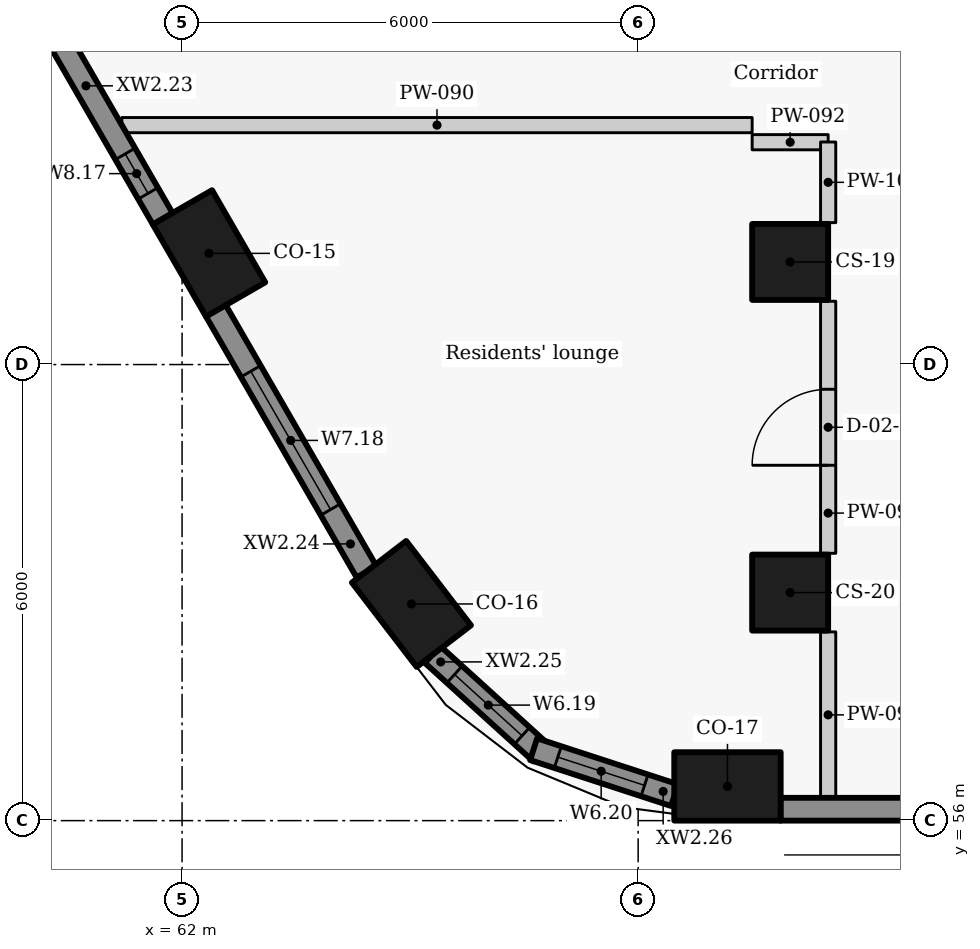
"""IFC4 building model, lengths in metres.
Left out: names, types, materials, properties, quantities, classifications, styles, units other than length and angle.
Written with IfcOpenShell. Run it as: python <this file> out.ifc"""

import sys

from ifc_helpers import new_model, si_unit, direction, frame, frame_2d, origin, origin_2d, place, context, subcontext, project, spatial, rectangle, extrude, element, fill, save


model = new_model("IFC4")
c1 = context("Model", 3, precision=1e-05, world=origin(), true_north=direction((0.0, 1.0)))
c2 = subcontext(c1, "Body", "Model", "MODEL_VIEW")
j1 = project(units=[si_unit("LENGTHUNIT", "METRE"), si_unit("PLANEANGLEUNIT", "RADIAN")], contexts=[c1])
p1 = place(None, origin())
s1 = spatial("IfcSite", under=j1, at=p1, CompositionType="ELEMENT")
p2 = place(p1, origin())
s2 = spatial("IfcBuilding", under=s1, at=p2, CompositionType="ELEMENT")
p3 = place(p2, frame((0.0, 0.0, 117.3)))
s3 = spatial("IfcBuildingStorey", under=s2, at=p3, CompositionType="ELEMENT", Elevation=117.3)
for number, where, z_axis, x_axis in (
    (1, (62.354, 63.463, 0.0), (0.0, 0.0, 1.0), (0.5, -0.866, 0.0)),
    (2, (65.018, 58.851, 0.0), (0.0, 0.0, 1.0), (0.609, -0.793, 0.0)),
    (3, (69.175, 56.45, 0.0), (0.0, 0.0, 1.0), (1.0, 0.0, 0.0)),
):
    element("IfcColumn", number, at=place(p3, frame(where, z_axis=z_axis, x_axis=x_axis)), inside=s3, PredefinedType="COLUMN", context=c2, shape_type="SweptSolid", body=[
        extrude(rectangle(XDim=1.4, YDim=0.9, at=origin_2d()), origin(), (0.0, 0.0, 1.0), 3.3),
    ])
for number, where, z_axis, x_axis in (
    (4, (70.0, 63.35, 0.0), (0.0, 0.0, 1.0), (0.0, -1.0, 0.0)),
    (5, (70.0, 59.0, 0.0), (0.0, 0.0, 1.0), (0.0, -1.0, 0.0)),
):
    element("IfcColumn", number, at=place(p3, frame(where, z_axis=z_axis, x_axis=x_axis)), inside=s3, PredefinedType="COLUMN", context=c2, shape_type="SweptSolid", body=[
        extrude(rectangle(XDim=1.0, YDim=1.0, at=origin_2d()), origin(), (0.0, 0.0, 1.0), 3.3),
    ])
p4 = place(p3, frame((59.78, 67.323, 0.0), z_axis=(0.0, 0.0, 1.0), x_axis=(0.499957037901, -0.866050206543, 0.0)))
e6 = element("IfcWall", 6, at=p4, inside=s3, PredefinedType="SOLIDWALL", context=c2, shape_type="SweptSolid", body=[
    extrude(rectangle(XDim=3.934, YDim=0.3, at=frame_2d((1.967, 0.0))), origin(), (0.0, 0.0, 1.0), 2.05),
])
p5 = place(p4, frame((0.278, 0.0, 0.9)))
e7 = element("IfcOpeningElement", 7, at=p5, cuts=e6, PredefinedType="OPENING", context=c2, shape_type="SweptSolid", body=[
    extrude(rectangle(XDim=0.6, YDim=1.1, at=frame_2d((0.3, 0.55))), frame((0.0, 0.16, 0.0), z_axis=(0.0, -1.0, 0.0), x_axis=(1.0, 0.0, 0.0)), (0.0, 0.0, 1.0), 0.32),
])
p6 = place(p4, frame((2.945, 0.0, 0.9)))
e8 = element("IfcOpeningElement", 8, at=p6, cuts=e6, PredefinedType="OPENING", context=c2, shape_type="SweptSolid", body=[
    extrude(rectangle(XDim=0.6, YDim=1.1, at=frame_2d((0.3, 0.55))), frame((0.0, 0.16, 0.0), z_axis=(0.0, -1.0, 0.0), x_axis=(1.0, 0.0, 0.0)), (0.0, 0.0, 1.0), 0.32),
])
p7 = place(p3, frame((62.443, 62.71, 0.0), z_axis=(0.0, 0.0, 1.0), x_axis=(0.500043828347, -0.866000097998, 0.0)))
e9 = element("IfcWall", 9, at=p7, inside=s3, PredefinedType="SOLIDWALL", context=c2, shape_type="SweptSolid", body=[
    extrude(rectangle(XDim=3.968, YDim=0.3, at=frame_2d((1.984, 0.0))), origin(), (0.0, 0.0, 1.0), 2.05),
])
p8 = place(p7, frame((0.922, 0.0, 0.9)))
e10 = element("IfcOpeningElement", 10, at=p8, cuts=e9, PredefinedType="OPENING", context=c2, shape_type="SweptSolid", body=[
    extrude(rectangle(XDim=2.1, YDim=1.1, at=frame_2d((1.05, 0.55))), frame((0.0, 0.16, 0.0), z_axis=(0.0, -1.0, 0.0), x_axis=(1.0, 0.0, 0.0)), (0.0, 0.0, 1.0), 0.32),
])
p9 = place(p3, frame((65.295, 58.186, 0.0), z_axis=(0.0, 0.0, 1.0), x_axis=(0.740421367382, -0.672142989791, 0.0)))
e11 = element("IfcWall", 11, at=p9, inside=s3, PredefinedType="SOLIDWALL", context=c2, shape_type="SweptSolid", body=[
    extrude(rectangle(XDim=1.927, YDim=0.3, at=frame_2d((0.964, 0.0))), origin(), (0.0, 0.0, 1.0), 2.05),
])
p10 = place(p9, frame((0.391, 0.0, 0.9)))
e12 = element("IfcOpeningElement", 12, at=p10, cuts=e11, PredefinedType="OPENING", context=c2, shape_type="SweptSolid", body=[
    extrude(rectangle(XDim=1.2, YDim=1.1, at=frame_2d((0.6, 0.55))), frame((0.0, 0.16, 0.0), z_axis=(0.0, -1.0, 0.0), x_axis=(1.0, 0.0, 0.0)), (0.0, 0.0, 1.0), 0.32),
])
p11 = place(p3, frame((66.625, 56.939, 0.0), z_axis=(0.0, 0.0, 1.0), x_axis=(0.950777961763, -0.309872985958, 0.0)))
e13 = element("IfcWall", 13, at=p11, inside=s3, PredefinedType="SOLIDWALL", context=c2, shape_type="SweptSolid", body=[
    extrude(rectangle(XDim=1.95, YDim=0.3, at=frame_2d((0.975, 0.0))), origin(), (0.0, 0.0, 1.0), 2.05),
])
p12 = place(p11, frame((0.335, 0.0, 0.9)))
e14 = element("IfcOpeningElement", 14, at=p12, cuts=e13, PredefinedType="OPENING", context=c2, shape_type="SweptSolid", body=[
    extrude(rectangle(XDim=1.2, YDim=1.1, at=frame_2d((0.6, 0.55))), frame((0.0, 0.16, 0.0), z_axis=(0.0, -1.0, 0.0), x_axis=(1.0, 0.0, 0.0)), (0.0, 0.0, 1.0), 0.32),
])
p13 = place(p3, frame((69.871, 56.15, 0.0), z_axis=(0.0, 0.0, 1.0), x_axis=(1.0, 0.0, 0.0)))
e15 = element("IfcWall", 15, at=p13, inside=s3, PredefinedType="SOLIDWALL", context=c2, shape_type="SweptSolid", body=[
    extrude(rectangle(XDim=19.94, YDim=0.3, at=frame_2d((9.97, 0.0))), origin(), (0.0, 0.0, 1.0), 2.05),
])
p14 = place(p3, frame((61.207, 65.15, 0.0), z_axis=(0.0, 0.0, 1.0), x_axis=(1.0, 0.0, 0.0)))
e16 = element("IfcWall", 16, at=p14, inside=s3, PredefinedType="PARTITIONING", context=c2, shape_type="SweptSolid", body=[
    extrude(rectangle(XDim=8.293, YDim=0.2, at=frame_2d((4.146, 0.0))), origin(), (0.0, 0.0, 1.0), 2.03),
])
p15 = place(p3, frame((69.5, 64.925, 0.0), z_axis=(0.0, 0.0, 1.0), x_axis=(1.0, 0.0, 0.0)))
e17 = element("IfcWall", 17, at=p15, inside=s3, PredefinedType="PARTITIONING", context=c2, shape_type="SweptSolid", body=[
    extrude(rectangle(XDim=1.0, YDim=0.2, at=frame_2d((0.5, 0.0))), origin(), (0.0, 0.0, 1.0), 2.43),
])
p16 = place(p3, frame((70.5, 56.3, 0.0), z_axis=(0.0, 0.0, 1.0), x_axis=(0.0, 1.0, 0.0)))
e18 = element("IfcWall", 18, at=p16, inside=s3, PredefinedType="PARTITIONING", context=c2, shape_type="SweptSolid", body=[
    extrude(rectangle(XDim=2.183, YDim=0.2, at=frame_2d((1.091, 0.0))), origin(), (0.0, 0.0, 1.0), 2.95),
])
p17 = place(p3, frame((70.5, 59.517, 0.0), z_axis=(0.0, 0.0, 1.0), x_axis=(0.0, 1.0, 0.0)))
e19 = element("IfcWall", 19, at=p17, inside=s3, PredefinedType="PARTITIONING", context=c2, shape_type="SweptSolid", body=[
    extrude(rectangle(XDim=3.316, YDim=0.2, at=frame_2d((1.658, 0.0))), origin(), (0.0, 0.0, 1.0), 2.95),
])
p18 = place(p17, frame((1.158, 0.0, 0.0)))
e20 = element("IfcOpeningElement", 20, at=p18, cuts=e19, PredefinedType="OPENING", context=c2, shape_type="SweptSolid", body=[
    extrude(rectangle(XDim=1.0, YDim=2.1, at=frame_2d((0.5, 1.05))), frame((0.0, 0.11, 0.0), z_axis=(0.0, -1.0, 0.0), x_axis=(1.0, 0.0, 0.0)), (0.0, 0.0, 1.0), 0.22),
])
p19 = place(p3, frame((70.5, 63.867, 0.0), z_axis=(0.0, 0.0, 1.0), x_axis=(0.0, 1.0, 0.0)))
e21 = element("IfcWall", 21, at=p19, inside=s3, PredefinedType="PARTITIONING", context=c2, shape_type="SweptSolid", body=[
    extrude(rectangle(XDim=1.061, YDim=0.2, at=frame_2d((0.531, 0.0))), origin(), (0.0, 0.0, 1.0), 2.95),
])
p20 = place(p6, origin())
e22 = element("IfcWindow", 22, at=p20, inside=s3, PartitioningType="SINGLE_PANEL", PredefinedType="WINDOW", context=c2, shape_type="SweptSolid", body=[
    extrude(rectangle(XDim=0.6, YDim=1.1, at=frame_2d((0.3, 0.55))), frame((0.0, 0.03, 0.0), z_axis=(0.0, -1.0, 0.0), x_axis=(1.0, 0.0, 0.0)), (0.0, 0.0, 1.0), 0.06),
])
fill(e8, e22)
p21 = place(p8, origin())
e23 = element("IfcWindow", 23, at=p21, inside=s3, PartitioningType="SINGLE_PANEL", PredefinedType="WINDOW", context=c2, shape_type="SweptSolid", body=[
    extrude(rectangle(XDim=2.1, YDim=1.1, at=frame_2d((1.05, 0.55))), frame((0.0, 0.03, 0.0), z_axis=(0.0, -1.0, 0.0), x_axis=(1.0, 0.0, 0.0)), (0.0, 0.0, 1.0), 0.06),
])
fill(e10, e23)
p22 = place(p10, origin())
e24 = element("IfcWindow", 24, at=p22, inside=s3, PartitioningType="SINGLE_PANEL", PredefinedType="WINDOW", context=c2, shape_type="SweptSolid", body=[
    extrude(rectangle(XDim=1.2, YDim=1.1, at=frame_2d((0.6, 0.55))), frame((0.0, 0.03, 0.0), z_axis=(0.0, -1.0, 0.0), x_axis=(1.0, 0.0, 0.0)), (0.0, 0.0, 1.0), 0.06),
])
fill(e12, e24)
p23 = place(p12, origin())
e25 = element("IfcWindow", 25, at=p23, inside=s3, PartitioningType="SINGLE_PANEL", PredefinedType="WINDOW", context=c2, shape_type="SweptSolid", body=[
    extrude(rectangle(XDim=1.2, YDim=1.1, at=frame_2d((0.6, 0.55))), frame((0.0, 0.03, 0.0), z_axis=(0.0, -1.0, 0.0), x_axis=(1.0, 0.0, 0.0)), (0.0, 0.0, 1.0), 0.06),
])
fill(e14, e25)
p24 = place(p18, origin())
e26 = element("IfcDoor", 26, at=p24, inside=s3, OperationType="SINGLE_SWING_LEFT", PredefinedType="DOOR", context=c2, shape_type="SweptSolid", body=[
    extrude(rectangle(XDim=1.0, YDim=2.1, at=frame_2d((0.5, 1.05))), frame((0.0, 0.025, 0.0), z_axis=(0.0, -1.0, 0.0), x_axis=(1.0, 0.0, 0.0)), (0.0, 0.0, 1.0), 0.05),
])
fill(e20, e26)
save(model, sys.argv[1])
